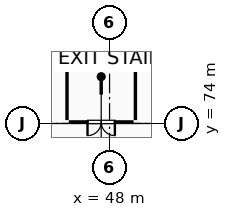
"""IFC4 building model, lengths in metres.
Left out: names, types, materials, properties, quantities, classifications, styles, units other than length and angle.
Written with IfcOpenShell. Run it as: python <this file> out.ifc"""

import sys

from ifc_helpers import new_model, si_unit, direction, frame, frame_2d, origin, place, context, subcontext, project, spatial, rectangle, extrude, element, fill, save


model = new_model("IFC4")
c1 = context("Model", 3, precision=1e-05, world=origin(), true_north=direction((0.0, 1.0)))
c2 = subcontext(c1, "Body", "Model", "MODEL_VIEW")
j1 = project(units=[si_unit("LENGTHUNIT", "METRE"), si_unit("PLANEANGLEUNIT", "RADIAN")], contexts=[c1])
p1 = place(None, origin())
s1 = spatial("IfcSite", under=j1, at=p1, CompositionType="ELEMENT")
p2 = place(p1, origin())
s2 = spatial("IfcBuilding", under=s1, at=p2, CompositionType="ELEMENT")
p3 = place(p2, frame((0.0, 0.0, 15.0)))
s3 = spatial("IfcBuildingStorey", under=s2, at=p3, CompositionType="ELEMENT", Elevation=15.0)
p4 = place(p3, frame((45.2, 74.22, 0.0), z_axis=(0.0, 0.0, 1.0), x_axis=(0.0, 1.0, 0.0)))
e1 = element("IfcWall", 1, at=p4, inside=s3, PredefinedType="PARTITIONING", context=c2, shape_type="SweptSolid", body=[
    extrude(rectangle(XDim=3.36, YDim=0.2, at=frame_2d((1.68, 0.0))), origin(), (0.0, 0.0, 1.0), 4.54),
])
p5 = place(p3, frame((45.32, 77.7, 0.0), z_axis=(0.0, 0.0, 1.0), x_axis=(1.0, 0.0, 0.0)))
e2 = element("IfcWall", 2, at=p5, inside=s3, PredefinedType="PARTITIONING", context=c2, shape_type="SweptSolid", body=[
    extrude(rectangle(XDim=4.26, YDim=0.2, at=frame_2d((2.13, 0.0))), origin(), (0.0, 0.0, 1.0), 4.54),
])
p6 = place(p3, frame((49.7, 77.58, 0.0), z_axis=(0.0, 0.0, 1.0), x_axis=(0.0, -1.0, 0.0)))
e3 = element("IfcWall", 3, at=p6, inside=s3, PredefinedType="PARTITIONING", context=c2, shape_type="SweptSolid", body=[
    extrude(rectangle(XDim=3.36, YDim=0.2, at=frame_2d((1.68, 0.0))), origin(), (0.0, 0.0, 1.0), 4.54),
])
p7 = place(p3, frame((49.58, 74.1, 0.0), z_axis=(0.0, 0.0, 1.0), x_axis=(-1.0, 0.0, 0.0)))
e4 = element("IfcWall", 4, at=p7, inside=s3, PredefinedType="PARTITIONING", context=c2, shape_type="SweptSolid", body=[
    extrude(rectangle(XDim=4.26, YDim=0.2, at=frame_2d((2.13, 0.0))), origin(), (0.0, 0.0, 1.0), 4.54),
])
p8 = place(p7, frame((1.23, 0.0, 0.0)))
e5 = element("IfcOpeningElement", 5, at=p8, cuts=e4, PredefinedType="OPENING", context=c2, shape_type="SweptSolid", body=[
    extrude(rectangle(XDim=1.8, YDim=2.15, at=frame_2d((0.9, 1.075))), frame((0.0, 0.11, 0.0), z_axis=(0.0, -1.0, 0.0), x_axis=(1.0, 0.0, 0.0)), (0.0, 0.0, 1.0), 0.22),
])
p9 = place(p8, origin())
e6 = element("IfcDoor", 6, at=p9, inside=s3, OperationType="DOUBLE_DOOR_SINGLE_SWING", PredefinedType="DOOR", context=c2, shape_type="SweptSolid", body=[
    extrude(rectangle(XDim=1.8, YDim=2.15, at=frame_2d((0.9, 1.075))), frame((0.0, 0.025, 0.0), z_axis=(0.0, -1.0, 0.0), x_axis=(1.0, 0.0, 0.0)), (0.0, 0.0, 1.0), 0.05),
])
fill(e5, e6)
save(model, sys.argv[1])
